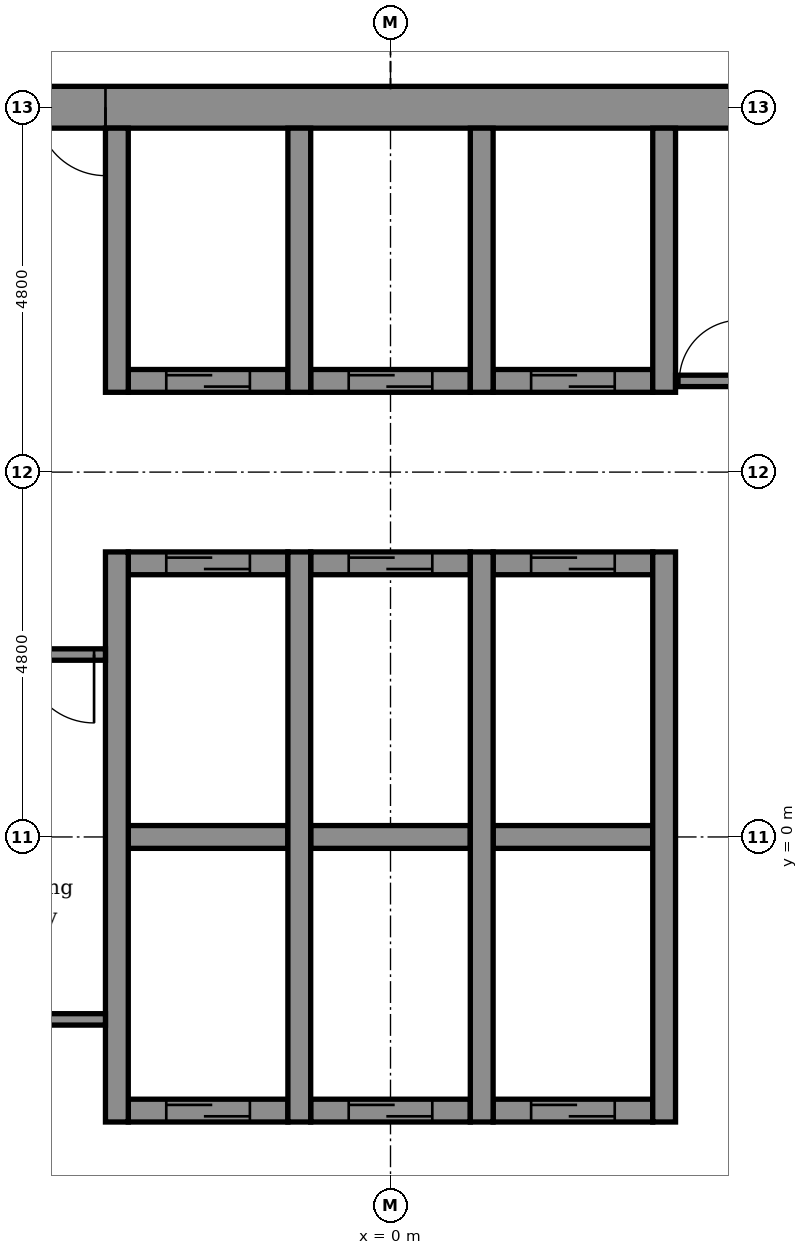
"""IFC4 building model, lengths in metres.
Left out: names, types, materials, properties, quantities, classifications, styles, units other than length and angle.
Written with IfcOpenShell. Run it as: python <this file> out.ifc"""

import sys

from ifc_helpers import new_model, si_unit, direction, frame, frame_2d, origin, place, context, subcontext, project, spatial, rectangle, extrude, element, fill, save


model = new_model("IFC4")
c1 = context("Model", 3, precision=1e-05, world=origin(), true_north=direction((0.0, 1.0)))
c2 = subcontext(c1, "Body", "Model", "MODEL_VIEW")
j1 = project(units=[si_unit("LENGTHUNIT", "METRE"), si_unit("PLANEANGLEUNIT", "RADIAN")], contexts=[c1])
p1 = place(None, origin())
s1 = spatial("IfcSite", under=j1, at=p1, CompositionType="ELEMENT")
p2 = place(p1, origin())
s2 = spatial("IfcBuilding", under=s1, at=p2, CompositionType="ELEMENT")
p3 = place(p2, frame((0.0, 0.0, 226.7)))
s3 = spatial("IfcBuildingStorey", under=s2, at=p3, CompositionType="ELEMENT", Elevation=226.7)
p4 = place(p3, frame((-3.45, -3.6, -0.15), z_axis=(0.0, 0.0, 1.0), x_axis=(1.0, 0.0, 0.0)))
e1 = element("IfcWall", 1, at=p4, inside=s3, PredefinedType="STANDARD", context=c2, shape_type="SweptSolid", body=[
    extrude(rectangle(XDim=2.1, YDim=0.3, at=frame_2d((1.05, 0.0))), origin(), (0.0, 0.0, 1.0), 3.9),
])
p5 = place(p4, frame((0.5, 0.0, 0.15)))
e2 = element("IfcOpeningElement", 2, at=p5, cuts=e1, PredefinedType="OPENING", context=c2, shape_type="SweptSolid", body=[
    extrude(rectangle(XDim=1.1, YDim=2.1, at=frame_2d((0.55, 1.05))), frame((0.0, 0.16, 0.0), z_axis=(0.0, -1.0, 0.0), x_axis=(1.0, 0.0, 0.0)), (0.0, 0.0, 1.0), 0.32),
])
p6 = place(p3, frame((-1.05, -3.6, -0.15), z_axis=(0.0, 0.0, 1.0), x_axis=(1.0, 0.0, 0.0)))
e3 = element("IfcWall", 3, at=p6, inside=s3, PredefinedType="STANDARD", context=c2, shape_type="SweptSolid", body=[
    extrude(rectangle(XDim=2.1, YDim=0.3, at=frame_2d((1.05, 0.0))), origin(), (0.0, 0.0, 1.0), 3.9),
])
p7 = place(p6, frame((0.5, 0.0, 0.15)))
e4 = element("IfcOpeningElement", 4, at=p7, cuts=e3, PredefinedType="OPENING", context=c2, shape_type="SweptSolid", body=[
    extrude(rectangle(XDim=1.1, YDim=2.1, at=frame_2d((0.55, 1.05))), frame((0.0, 0.16, 0.0), z_axis=(0.0, -1.0, 0.0), x_axis=(1.0, 0.0, 0.0)), (0.0, 0.0, 1.0), 0.32),
])
p8 = place(p3, frame((1.35, -3.6, -0.15), z_axis=(0.0, 0.0, 1.0), x_axis=(1.0, 0.0, 0.0)))
e5 = element("IfcWall", 5, at=p8, inside=s3, PredefinedType="STANDARD", context=c2, shape_type="SweptSolid", body=[
    extrude(rectangle(XDim=2.1, YDim=0.3, at=frame_2d((1.05, 0.0))), origin(), (0.0, 0.0, 1.0), 3.9),
])
p9 = place(p8, frame((0.5, 0.0, 0.15)))
e6 = element("IfcOpeningElement", 6, at=p9, cuts=e5, PredefinedType="OPENING", context=c2, shape_type="SweptSolid", body=[
    extrude(rectangle(XDim=1.1, YDim=2.1, at=frame_2d((0.55, 1.05))), frame((0.0, 0.16, 0.0), z_axis=(0.0, -1.0, 0.0), x_axis=(1.0, 0.0, 0.0)), (0.0, 0.0, 1.0), 0.32),
])
p10 = place(p3, frame((-3.45, 0.0, -0.15), z_axis=(0.0, 0.0, 1.0), x_axis=(1.0, 0.0, 0.0)))
e7 = element("IfcWall", 7, at=p10, inside=s3, PredefinedType="STANDARD", context=c2, shape_type="SweptSolid", body=[
    extrude(rectangle(XDim=2.1, YDim=0.3, at=frame_2d((1.05, 0.0))), origin(), (0.0, 0.0, 1.0), 3.9),
])
p11 = place(p3, frame((-1.05, 0.0, -0.15), z_axis=(0.0, 0.0, 1.0), x_axis=(1.0, 0.0, 0.0)))
e8 = element("IfcWall", 8, at=p11, inside=s3, PredefinedType="STANDARD", context=c2, shape_type="SweptSolid", body=[
    extrude(rectangle(XDim=2.1, YDim=0.3, at=frame_2d((1.05, 0.0))), origin(), (0.0, 0.0, 1.0), 3.9),
])
p12 = place(p3, frame((1.35, 0.0, -0.15), z_axis=(0.0, 0.0, 1.0), x_axis=(1.0, 0.0, 0.0)))
e9 = element("IfcWall", 9, at=p12, inside=s3, PredefinedType="STANDARD", context=c2, shape_type="SweptSolid", body=[
    extrude(rectangle(XDim=2.1, YDim=0.3, at=frame_2d((1.05, 0.0))), origin(), (0.0, 0.0, 1.0), 3.9),
])
p13 = place(p3, frame((-3.45, 3.6, -0.15), z_axis=(0.0, 0.0, 1.0), x_axis=(1.0, 0.0, 0.0)))
e10 = element("IfcWall", 10, at=p13, inside=s3, PredefinedType="STANDARD", context=c2, shape_type="SweptSolid", body=[
    extrude(rectangle(XDim=2.1, YDim=0.3, at=frame_2d((1.05, 0.0))), origin(), (0.0, 0.0, 1.0), 3.9),
])
p14 = place(p13, frame((0.5, 0.0, 0.15)))
e11 = element("IfcOpeningElement", 11, at=p14, cuts=e10, PredefinedType="OPENING", context=c2, shape_type="SweptSolid", body=[
    extrude(rectangle(XDim=1.1, YDim=2.1, at=frame_2d((0.55, 1.05))), frame((0.0, 0.16, 0.0), z_axis=(0.0, -1.0, 0.0), x_axis=(1.0, 0.0, 0.0)), (0.0, 0.0, 1.0), 0.32),
])
p15 = place(p3, frame((-1.05, 3.6, -0.15), z_axis=(0.0, 0.0, 1.0), x_axis=(1.0, 0.0, 0.0)))
e12 = element("IfcWall", 12, at=p15, inside=s3, PredefinedType="STANDARD", context=c2, shape_type="SweptSolid", body=[
    extrude(rectangle(XDim=2.1, YDim=0.3, at=frame_2d((1.05, 0.0))), origin(), (0.0, 0.0, 1.0), 3.9),
])
p16 = place(p15, frame((0.5, 0.0, 0.15)))
e13 = element("IfcOpeningElement", 13, at=p16, cuts=e12, PredefinedType="OPENING", context=c2, shape_type="SweptSolid", body=[
    extrude(rectangle(XDim=1.1, YDim=2.1, at=frame_2d((0.55, 1.05))), frame((0.0, 0.16, 0.0), z_axis=(0.0, -1.0, 0.0), x_axis=(1.0, 0.0, 0.0)), (0.0, 0.0, 1.0), 0.32),
])
p17 = place(p3, frame((1.35, 3.6, -0.15), z_axis=(0.0, 0.0, 1.0), x_axis=(1.0, 0.0, 0.0)))
e14 = element("IfcWall", 14, at=p17, inside=s3, PredefinedType="STANDARD", context=c2, shape_type="SweptSolid", body=[
    extrude(rectangle(XDim=2.1, YDim=0.3, at=frame_2d((1.05, 0.0))), origin(), (0.0, 0.0, 1.0), 3.9),
])
p18 = place(p17, frame((0.5, 0.0, 0.15)))
e15 = element("IfcOpeningElement", 15, at=p18, cuts=e14, PredefinedType="OPENING", context=c2, shape_type="SweptSolid", body=[
    extrude(rectangle(XDim=1.1, YDim=2.1, at=frame_2d((0.55, 1.05))), frame((0.0, 0.16, 0.0), z_axis=(0.0, -1.0, 0.0), x_axis=(1.0, 0.0, 0.0)), (0.0, 0.0, 1.0), 0.32),
])
p19 = place(p3, frame((-3.45, 6.0, -0.15), z_axis=(0.0, 0.0, 1.0), x_axis=(1.0, 0.0, 0.0)))
e16 = element("IfcWall", 16, at=p19, inside=s3, PredefinedType="STANDARD", context=c2, shape_type="SweptSolid", body=[
    extrude(rectangle(XDim=2.1, YDim=0.3, at=frame_2d((1.05, 0.0))), origin(), (0.0, 0.0, 1.0), 3.9),
])
p20 = place(p19, frame((0.5, 0.0, 0.15)))
e17 = element("IfcOpeningElement", 17, at=p20, cuts=e16, PredefinedType="OPENING", context=c2, shape_type="SweptSolid", body=[
    extrude(rectangle(XDim=1.1, YDim=2.1, at=frame_2d((0.55, 1.05))), frame((0.0, 0.16, 0.0), z_axis=(0.0, -1.0, 0.0), x_axis=(1.0, 0.0, 0.0)), (0.0, 0.0, 1.0), 0.32),
])
p21 = place(p3, frame((-1.05, 6.0, -0.15), z_axis=(0.0, 0.0, 1.0), x_axis=(1.0, 0.0, 0.0)))
e18 = element("IfcWall", 18, at=p21, inside=s3, PredefinedType="STANDARD", context=c2, shape_type="SweptSolid", body=[
    extrude(rectangle(XDim=2.1, YDim=0.3, at=frame_2d((1.05, 0.0))), origin(), (0.0, 0.0, 1.0), 3.9),
])
p22 = place(p21, frame((0.5, 0.0, 0.15)))
e19 = element("IfcOpeningElement", 19, at=p22, cuts=e18, PredefinedType="OPENING", context=c2, shape_type="SweptSolid", body=[
    extrude(rectangle(XDim=1.1, YDim=2.1, at=frame_2d((0.55, 1.05))), frame((0.0, 0.16, 0.0), z_axis=(0.0, -1.0, 0.0), x_axis=(1.0, 0.0, 0.0)), (0.0, 0.0, 1.0), 0.32),
])
p23 = place(p3, frame((1.35, 6.0, -0.15), z_axis=(0.0, 0.0, 1.0), x_axis=(1.0, 0.0, 0.0)))
e20 = element("IfcWall", 20, at=p23, inside=s3, PredefinedType="STANDARD", context=c2, shape_type="SweptSolid", body=[
    extrude(rectangle(XDim=2.1, YDim=0.3, at=frame_2d((1.05, 0.0))), origin(), (0.0, 0.0, 1.0), 3.9),
])
p24 = place(p23, frame((0.5, 0.0, 0.15)))
e21 = element("IfcOpeningElement", 21, at=p24, cuts=e20, PredefinedType="OPENING", context=c2, shape_type="SweptSolid", body=[
    extrude(rectangle(XDim=1.1, YDim=2.1, at=frame_2d((0.55, 1.05))), frame((0.0, 0.16, 0.0), z_axis=(0.0, -1.0, 0.0), x_axis=(1.0, 0.0, 0.0)), (0.0, 0.0, 1.0), 0.32),
])
p25 = place(p3, frame((-5.25, 9.6, -0.15), z_axis=(0.0, 0.0, 1.0), x_axis=(1.0, 0.0, 0.0)))
e22 = element("IfcWall", 22, at=p25, inside=s3, PredefinedType="SHEAR", context=c2, shape_type="SweptSolid", body=[
    extrude(rectangle(XDim=14.575, YDim=0.55, at=frame_2d((7.288, 0.0))), origin(), (0.0, 0.0, 1.0), 3.9),
])
p26 = place(p25, frame((0.6, 0.0, 0.15)))
e23 = element("IfcOpeningElement", 23, at=p26, cuts=e22, PredefinedType="OPENING", context=c2, shape_type="SweptSolid", body=[
    extrude(rectangle(XDim=0.9, YDim=2.1, at=frame_2d((0.45, 1.05))), frame((0.0, 0.285, 0.0), z_axis=(0.0, -1.0, 0.0), x_axis=(1.0, 0.0, 0.0)), (0.0, 0.0, 1.0), 0.57),
])
p27 = place(p3, frame((-3.6, -3.75, -0.15), z_axis=(0.0, 0.0, 1.0), x_axis=(0.0, 1.0, 0.0)))
e24 = element("IfcWall", 24, at=p27, inside=s3, PredefinedType="STANDARD", context=c2, shape_type="SweptSolid", body=[
    extrude(rectangle(XDim=7.5, YDim=0.3, at=frame_2d((3.75, 0.0))), origin(), (0.0, 0.0, 1.0), 3.9),
])
p28 = place(p3, frame((-3.6, 5.85, -0.15), z_axis=(0.0, 0.0, 1.0), x_axis=(0.0, 1.0, 0.0)))
e25 = element("IfcWall", 25, at=p28, inside=s3, PredefinedType="STANDARD", context=c2, shape_type="SweptSolid", body=[
    extrude(rectangle(XDim=3.475, YDim=0.3, at=frame_2d((1.737, 0.0))), origin(), (0.0, 0.0, 1.0), 3.9),
])
p29 = place(p3, frame((-1.2, -3.75, -0.15), z_axis=(0.0, 0.0, 1.0), x_axis=(0.0, 1.0, 0.0)))
e26 = element("IfcWall", 26, at=p29, inside=s3, PredefinedType="STANDARD", context=c2, shape_type="SweptSolid", body=[
    extrude(rectangle(XDim=7.5, YDim=0.3, at=frame_2d((3.75, 0.0))), origin(), (0.0, 0.0, 1.0), 3.9),
])
p30 = place(p3, frame((-1.2, 5.85, -0.15), z_axis=(0.0, 0.0, 1.0), x_axis=(0.0, 1.0, 0.0)))
e27 = element("IfcWall", 27, at=p30, inside=s3, PredefinedType="STANDARD", context=c2, shape_type="SweptSolid", body=[
    extrude(rectangle(XDim=3.475, YDim=0.3, at=frame_2d((1.737, 0.0))), origin(), (0.0, 0.0, 1.0), 3.9),
])
p31 = place(p3, frame((1.2, -3.75, -0.15), z_axis=(0.0, 0.0, 1.0), x_axis=(0.0, 1.0, 0.0)))
e28 = element("IfcWall", 28, at=p31, inside=s3, PredefinedType="STANDARD", context=c2, shape_type="SweptSolid", body=[
    extrude(rectangle(XDim=7.5, YDim=0.3, at=frame_2d((3.75, 0.0))), origin(), (0.0, 0.0, 1.0), 3.9),
])
p32 = place(p3, frame((1.2, 5.85, -0.15), z_axis=(0.0, 0.0, 1.0), x_axis=(0.0, 1.0, 0.0)))
e29 = element("IfcWall", 29, at=p32, inside=s3, PredefinedType="STANDARD", context=c2, shape_type="SweptSolid", body=[
    extrude(rectangle(XDim=3.475, YDim=0.3, at=frame_2d((1.737, 0.0))), origin(), (0.0, 0.0, 1.0), 3.9),
])
p33 = place(p3, frame((3.6, -3.75, -0.15), z_axis=(0.0, 0.0, 1.0), x_axis=(0.0, 1.0, 0.0)))
e30 = element("IfcWall", 30, at=p33, inside=s3, PredefinedType="STANDARD", context=c2, shape_type="SweptSolid", body=[
    extrude(rectangle(XDim=7.5, YDim=0.3, at=frame_2d((3.75, 0.0))), origin(), (0.0, 0.0, 1.0), 3.9),
])
p34 = place(p3, frame((3.6, 5.85, -0.15), z_axis=(0.0, 0.0, 1.0), x_axis=(0.0, 1.0, 0.0)))
e31 = element("IfcWall", 31, at=p34, inside=s3, PredefinedType="STANDARD", context=c2, shape_type="SweptSolid", body=[
    extrude(rectangle(XDim=3.475, YDim=0.3, at=frame_2d((1.737, 0.0))), origin(), (0.0, 0.0, 1.0), 3.9),
])
p35 = place(p3, frame((3.75, 6.0, 0.0), z_axis=(0.0, 0.0, 1.0), x_axis=(1.0, 0.0, 0.0)))
e32 = element("IfcWall", 32, at=p35, inside=s3, PredefinedType="PARTITIONING", context=c2, shape_type="SweptSolid", body=[
    extrude(rectangle(XDim=1.05, YDim=0.15, at=frame_2d((0.525, 0.0))), origin(), (0.0, 0.0, 1.0), 3.75),
])
p36 = place(p35, frame((0.05, 0.0, 0.0)))
e33 = element("IfcOpeningElement", 33, at=p36, cuts=e32, PredefinedType="OPENING", context=c2, shape_type="SweptSolid", body=[
    extrude(rectangle(XDim=0.8, YDim=2.1, at=frame_2d((0.4, 1.05))), frame((0.0, 0.085, 0.0), z_axis=(0.0, -1.0, 0.0), x_axis=(1.0, 0.0, 0.0)), (0.0, 0.0, 1.0), 0.17),
])
p37 = place(p3, frame((-4.95, 2.4, 0.0), z_axis=(0.0, 0.0, 1.0), x_axis=(1.0, 0.0, 0.0)))
e34 = element("IfcWall", 34, at=p37, inside=s3, PredefinedType="PARTITIONING", context=c2, shape_type="SweptSolid", body=[
    extrude(rectangle(XDim=1.2, YDim=0.15, at=frame_2d((0.6, 0.0))), origin(), (0.0, 0.0, 1.0), 3.75),
])
p38 = place(p37, frame((0.15, 0.0, 0.0)))
e35 = element("IfcOpeningElement", 35, at=p38, cuts=e34, PredefinedType="OPENING", context=c2, shape_type="SweptSolid", body=[
    extrude(rectangle(XDim=0.9, YDim=2.1, at=frame_2d((0.45, 1.05))), frame((0.0, 0.085, 0.0), z_axis=(0.0, -1.0, 0.0), x_axis=(1.0, 0.0, 0.0)), (0.0, 0.0, 1.0), 0.17),
])
p39 = place(p3, frame((-4.95, -2.4, 0.0), z_axis=(0.0, 0.0, 1.0), x_axis=(1.0, 0.0, 0.0)))
e36 = element("IfcWall", 36, at=p39, inside=s3, PredefinedType="PARTITIONING", context=c2, shape_type="SweptSolid", body=[
    extrude(rectangle(XDim=1.2, YDim=0.15, at=frame_2d((0.6, 0.0))), origin(), (0.0, 0.0, 1.0), 3.75),
])
p40 = place(p36, origin())
e37 = element("IfcDoor", 37, at=p40, inside=s3, OperationType="SINGLE_SWING_RIGHT", PredefinedType="DOOR", context=c2, shape_type="SweptSolid", body=[
    extrude(rectangle(XDim=0.8, YDim=2.1, at=frame_2d((0.4, 1.05))), frame((0.0, 0.025, 0.0), z_axis=(0.0, -1.0, 0.0), x_axis=(1.0, 0.0, 0.0)), (0.0, 0.0, 1.0), 0.05),
])
fill(e33, e37)
p41 = place(p20, origin())
e38 = element("IfcDoor", 38, at=p41, inside=s3, OperationType="DOUBLE_DOOR_SLIDING", PredefinedType="DOOR", context=c2, shape_type="SweptSolid", body=[
    extrude(rectangle(XDim=1.1, YDim=2.1, at=frame_2d((0.55, 1.05))), frame((0.0, 0.025, 0.0), z_axis=(0.0, -1.0, 0.0), x_axis=(1.0, 0.0, 0.0)), (0.0, 0.0, 1.0), 0.05),
])
fill(e17, e38)
p42 = place(p22, origin())
e39 = element("IfcDoor", 39, at=p42, inside=s3, OperationType="DOUBLE_DOOR_SLIDING", PredefinedType="DOOR", context=c2, shape_type="SweptSolid", body=[
    extrude(rectangle(XDim=1.1, YDim=2.1, at=frame_2d((0.55, 1.05))), frame((0.0, 0.025, 0.0), z_axis=(0.0, -1.0, 0.0), x_axis=(1.0, 0.0, 0.0)), (0.0, 0.0, 1.0), 0.05),
])
fill(e19, e39)
p43 = place(p24, origin())
e40 = element("IfcDoor", 40, at=p43, inside=s3, OperationType="DOUBLE_DOOR_SLIDING", PredefinedType="DOOR", context=c2, shape_type="SweptSolid", body=[
    extrude(rectangle(XDim=1.1, YDim=2.1, at=frame_2d((0.55, 1.05))), frame((0.0, 0.025, 0.0), z_axis=(0.0, -1.0, 0.0), x_axis=(1.0, 0.0, 0.0)), (0.0, 0.0, 1.0), 0.05),
])
fill(e21, e40)
p44 = place(p14, origin())
e41 = element("IfcDoor", 41, at=p44, inside=s3, OperationType="DOUBLE_DOOR_SLIDING", PredefinedType="DOOR", context=c2, shape_type="SweptSolid", body=[
    extrude(rectangle(XDim=1.1, YDim=2.1, at=frame_2d((0.55, 1.05))), frame((0.0, 0.025, 0.0), z_axis=(0.0, -1.0, 0.0), x_axis=(1.0, 0.0, 0.0)), (0.0, 0.0, 1.0), 0.05),
])
fill(e11, e41)
p45 = place(p16, origin())
e42 = element("IfcDoor", 42, at=p45, inside=s3, OperationType="DOUBLE_DOOR_SLIDING", PredefinedType="DOOR", context=c2, shape_type="SweptSolid", body=[
    extrude(rectangle(XDim=1.1, YDim=2.1, at=frame_2d((0.55, 1.05))), frame((0.0, 0.025, 0.0), z_axis=(0.0, -1.0, 0.0), x_axis=(1.0, 0.0, 0.0)), (0.0, 0.0, 1.0), 0.05),
])
fill(e13, e42)
p46 = place(p18, origin())
e43 = element("IfcDoor", 43, at=p46, inside=s3, OperationType="DOUBLE_DOOR_SLIDING", PredefinedType="DOOR", context=c2, shape_type="SweptSolid", body=[
    extrude(rectangle(XDim=1.1, YDim=2.1, at=frame_2d((0.55, 1.05))), frame((0.0, 0.025, 0.0), z_axis=(0.0, -1.0, 0.0), x_axis=(1.0, 0.0, 0.0)), (0.0, 0.0, 1.0), 0.05),
])
fill(e15, e43)
p47 = place(p5, origin())
e44 = element("IfcDoor", 44, at=p47, inside=s3, OperationType="DOUBLE_DOOR_SLIDING", PredefinedType="DOOR", context=c2, shape_type="SweptSolid", body=[
    extrude(rectangle(XDim=1.1, YDim=2.1, at=frame_2d((0.55, 1.05))), frame((0.0, 0.025, 0.0), z_axis=(0.0, -1.0, 0.0), x_axis=(1.0, 0.0, 0.0)), (0.0, 0.0, 1.0), 0.05),
])
fill(e2, e44)
p48 = place(p7, origin())
e45 = element("IfcDoor", 45, at=p48, inside=s3, OperationType="DOUBLE_DOOR_SLIDING", PredefinedType="DOOR", context=c2, shape_type="SweptSolid", body=[
    extrude(rectangle(XDim=1.1, YDim=2.1, at=frame_2d((0.55, 1.05))), frame((0.0, 0.025, 0.0), z_axis=(0.0, -1.0, 0.0), x_axis=(1.0, 0.0, 0.0)), (0.0, 0.0, 1.0), 0.05),
])
fill(e4, e45)
p49 = place(p9, origin())
e46 = element("IfcDoor", 46, at=p49, inside=s3, OperationType="DOUBLE_DOOR_SLIDING", PredefinedType="DOOR", context=c2, shape_type="SweptSolid", body=[
    extrude(rectangle(XDim=1.1, YDim=2.1, at=frame_2d((0.55, 1.05))), frame((0.0, 0.025, 0.0), z_axis=(0.0, -1.0, 0.0), x_axis=(1.0, 0.0, 0.0)), (0.0, 0.0, 1.0), 0.05),
])
fill(e6, e46)
p50 = place(p26, frame((0.9, 0.0, 0.0), z_axis=(0.0, 0.0, 1.0), x_axis=(-1.0, 0.0, 0.0)))
e47 = element("IfcDoor", 47, at=p50, inside=s3, OperationType="SINGLE_SWING_RIGHT", PredefinedType="DOOR", context=c2, shape_type="SweptSolid", body=[
    extrude(rectangle(XDim=0.9, YDim=2.1, at=frame_2d((0.45, 1.05))), frame((0.0, 0.025, 0.0), z_axis=(0.0, -1.0, 0.0), x_axis=(1.0, 0.0, 0.0)), (0.0, 0.0, 1.0), 0.05),
])
fill(e23, e47)
p51 = place(p38, frame((0.9, 0.0, 0.0), z_axis=(0.0, 0.0, 1.0), x_axis=(-1.0, 0.0, 0.0)))
e48 = element("IfcDoor", 48, at=p51, inside=s3, OperationType="SINGLE_SWING_RIGHT", PredefinedType="DOOR", context=c2, shape_type="SweptSolid", body=[
    extrude(rectangle(XDim=0.9, YDim=2.1, at=frame_2d((0.45, 1.05))), frame((0.0, 0.025, 0.0), z_axis=(0.0, -1.0, 0.0), x_axis=(1.0, 0.0, 0.0)), (0.0, 0.0, 1.0), 0.05),
])
fill(e35, e48)
save(model, sys.argv[1])
